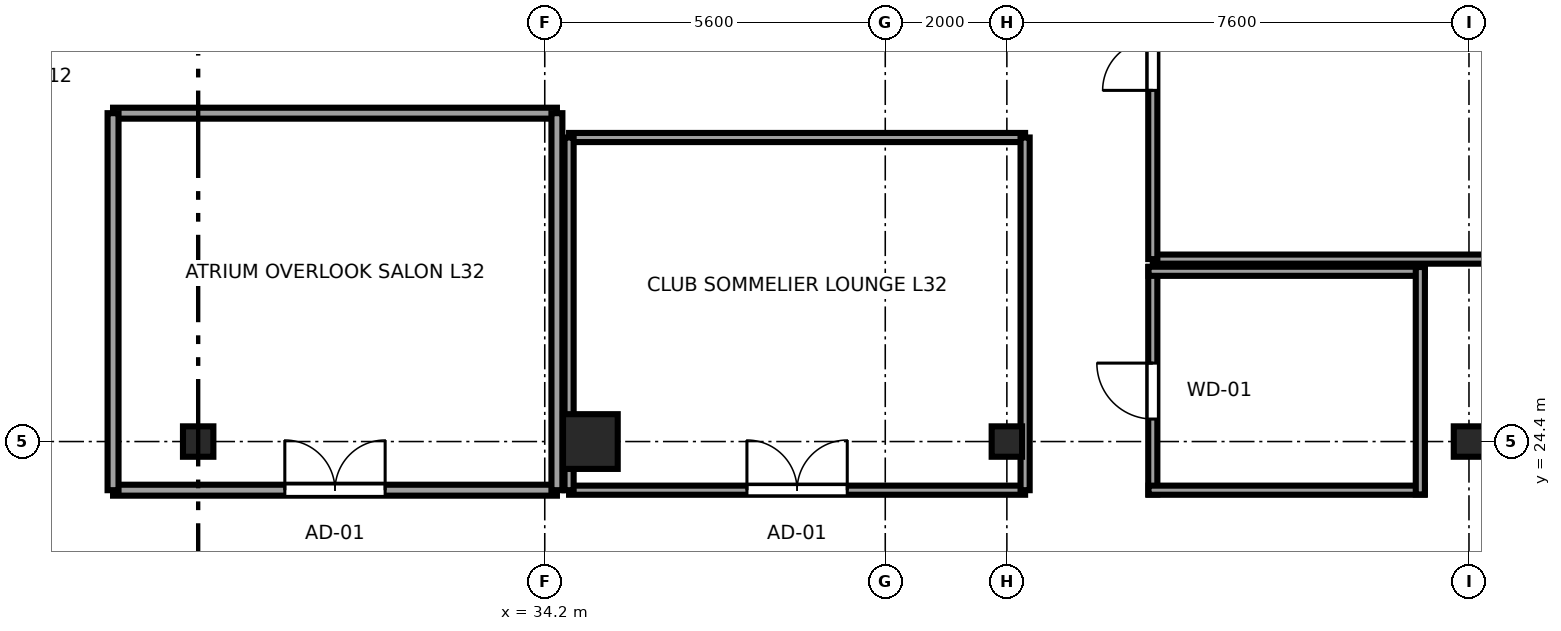
"""IFC4 building model, lengths in metres.
Left out: names, types, materials, properties, quantities, classifications, styles, units other than length and angle.
Written with IfcOpenShell. Run it as: python <this file> out.ifc"""

import sys

from ifc_helpers import new_model, si_unit, direction, frame, frame_2d, origin, origin_2d, place, context, subcontext, project, spatial, rectangle, i_section, extrude, source, transform, mapped, element, fill, save


model = new_model("IFC4")
c1 = context("Model", 3, precision=1e-05, world=origin(), true_north=direction((0.0, 1.0)))
c2 = subcontext(c1, "Body", "Model", "MODEL_VIEW")
j1 = project(units=[si_unit("LENGTHUNIT", "METRE"), si_unit("PLANEANGLEUNIT", "RADIAN")], contexts=[c1])
p1 = place(None, origin())
s1 = spatial("IfcSite", under=j1, at=p1, CompositionType="ELEMENT")
p2 = place(p1, origin())
s2 = spatial("IfcBuilding", under=s1, at=p2, CompositionType="ELEMENT")
p3 = place(p2, frame((0.0, 0.0, 125.75)))
s3 = spatial("IfcBuildingStorey", under=s2, at=p3, CompositionType="ELEMENT", Elevation=125.75)
m1 = source(origin(), c2, "Body", "SweptSolid", [
    extrude(rectangle(XDim=0.9, YDim=0.9, at=origin_2d()), origin(), (0.0, 0.0, 1.0), 3.55),
])
p4 = place(p3, frame((34.95, 24.4, 0.0), z_axis=(0.0, 0.0, 1.0), x_axis=(1.0, 0.0, 0.0)))
e1 = element("IfcColumn", 1, at=p4, inside=s3, PredefinedType="COLUMN", context=c2, shape_type="MappedRepresentation", body=[
    mapped(m1, transform((0.0, 0.0, 0.0), x_axis=(1.0, 0.0, 0.0), y_axis=(0.0, 1.0, 0.0), z_axis=(0.0, 0.0, 1.0), scale=1.0)),
])
m2 = source(origin(), c2, "Body", "SweptSolid", [
    extrude(i_section(OverallWidth=0.5, OverallDepth=0.5, WebThickness=0.022, FlangeThickness=0.034, at=origin_2d()), origin(), (0.0, 0.0, 1.0), 3.55),
])
for number, where, z_axis, x_axis in (
    (2, (41.8, 24.4, 0.0), (0.0, 0.0, 1.0), (1.0, 0.0, 0.0)),
    (3, (49.4, 24.4, 0.0), (0.0, 0.0, 1.0), (1.0, 0.0, 0.0)),
    (4, (28.5, 24.4, 0.0), (0.0, 0.0, 1.0), (1.0, 0.0, 0.0)),
):
    element("IfcColumn", number, at=place(p3, frame(where, z_axis=z_axis, x_axis=x_axis)), inside=s3, PredefinedType="COLUMN", context=c2, shape_type="MappedRepresentation", body=[
        mapped(m2, transform((0.0, 0.0, 0.0), x_axis=(1.0, 0.0, 0.0), y_axis=(0.0, 1.0, 0.0), z_axis=(0.0, 0.0, 1.0), scale=1.0)),
    ])
p5 = place(p3, frame((44.2, 23.53, 0.0), z_axis=(0.0, 0.0, 1.0), x_axis=(0.0, 1.0, 0.0)))
e5 = element("IfcWall", 5, at=p5, inside=s3, PredefinedType="PARTITIONING", context=c2, shape_type="SweptSolid", body=[
    extrude(rectangle(XDim=3.74, YDim=0.15, at=frame_2d((1.87, 0.0))), origin(), (0.0, 0.0, 1.0), 3.37),
])
p6 = place(p5, frame((1.24, 0.0, 0.0)))
e6 = element("IfcOpeningElement", 6, at=p6, cuts=e5, PredefinedType="OPENING", context=c2, shape_type="SweptSolid", body=[
    extrude(rectangle(XDim=0.92, YDim=2.01, at=frame_2d((0.46, 1.005))), frame((0.0, 0.085, 0.0), z_axis=(0.0, -1.0, 0.0), x_axis=(1.0, 0.0, 0.0)), (0.0, 0.0, 1.0), 0.17),
])
for number, where, z_axis, x_axis in (
    (7, (44.13, 23.6, 0.0), (0.0, 0.0, 1.0), (1.0, 0.0, 0.0)),
    (8, (44.13, 27.2, 0.0), (0.0, 0.0, 1.0), (1.0, 0.0, 0.0)),
):
    element("IfcWall", number, at=place(p3, frame(where, z_axis=z_axis, x_axis=x_axis)), inside=s3, PredefinedType="PARTITIONING", context=c2, shape_type="SweptSolid", body=[
        extrude(rectangle(XDim=4.54, YDim=0.15, at=frame_2d((2.27, 0.0))), origin(), (0.0, 0.0, 1.0), 3.37),
    ])
p7 = place(p3, frame((48.6, 23.53, 0.0), z_axis=(0.0, 0.0, 1.0), x_axis=(0.0, 1.0, 0.0)))
e9 = element("IfcWall", 9, at=p7, inside=s3, PredefinedType="PARTITIONING", context=c2, shape_type="SweptSolid", body=[
    extrude(rectangle(XDim=3.74, YDim=0.15, at=frame_2d((1.87, 0.0))), origin(), (0.0, 0.0, 1.0), 3.37),
])
p8 = place(p3, frame((44.2, 27.4, 0.0), z_axis=(0.0, 0.0, 1.0), x_axis=(1.0, 0.0, 0.0)))
e10 = element("IfcWall", 10, at=p8, inside=s3, PredefinedType="PARTITIONING", context=c2, shape_type="SweptSolid", body=[
    extrude(rectangle(XDim=12.5, YDim=0.15, at=frame_2d((6.25, 0.0))), origin(), (0.0, 0.0, 1.0), 3.37),
])
p9 = place(p3, frame((44.2, 27.4, 0.0), z_axis=(0.0, 0.0, 1.0), x_axis=(0.0, 1.0, 0.0)))
e11 = element("IfcWall", 11, at=p9, inside=s3, PredefinedType="PARTITIONING", context=c2, shape_type="SweptSolid", body=[
    extrude(rectangle(XDim=7.2, YDim=0.15, at=frame_2d((3.6, 0.0))), origin(), (0.0, 0.0, 1.0), 3.37),
])
p10 = place(p9, frame((2.775, 0.0, 0.0)))
e12 = element("IfcOpeningElement", 12, at=p10, cuts=e11, PredefinedType="OPENING", context=c2, shape_type="SweptSolid", body=[
    extrude(rectangle(XDim=1.65, YDim=2.15, at=frame_2d((0.825, 1.075))), frame((0.0, 0.085, 0.0), z_axis=(0.0, -1.0, 0.0), x_axis=(1.0, 0.0, 0.0)), (0.0, 0.0, 1.0), 0.17),
])
p11 = place(p3, frame((27.1, 23.6, 0.0), z_axis=(0.0, 0.0, 1.0), x_axis=(1.0, 0.0, 0.0)))
e13 = element("IfcWall", 13, at=p11, inside=s3, PredefinedType="PARTITIONING", context=c2, shape_type="SweptSolid", body=[
    extrude(rectangle(XDim=7.3, YDim=0.18, at=frame_2d((3.65, 0.0))), origin(), (0.0, 0.0, 1.0), 3.37),
])
p12 = place(p11, frame((2.825, 0.0, 0.0)))
e14 = element("IfcOpeningElement", 14, at=p12, cuts=e13, PredefinedType="OPENING", context=c2, shape_type="SweptSolid", body=[
    extrude(rectangle(XDim=1.65, YDim=2.15, at=frame_2d((0.825, 1.075))), frame((0.0, 0.1, 0.0), z_axis=(0.0, -1.0, 0.0), x_axis=(1.0, 0.0, 0.0)), (0.0, 0.0, 1.0), 0.2),
])
p13 = place(p3, frame((27.1, 29.8, 0.0), z_axis=(0.0, 0.0, 1.0), x_axis=(1.0, 0.0, 0.0)))
e15 = element("IfcWall", 15, at=p13, inside=s3, PredefinedType="PARTITIONING", context=c2, shape_type="SweptSolid", body=[
    extrude(rectangle(XDim=7.3, YDim=0.18, at=frame_2d((3.65, 0.0))), origin(), (0.0, 0.0, 1.0), 3.37),
])
for number, where, z_axis, x_axis in (
    (16, (27.1, 23.6, 0.0), (0.0, 0.0, 1.0), (0.0, 1.0, 0.0)),
    (17, (34.4, 23.6, 0.0), (0.0, 0.0, 1.0), (0.0, 1.0, 0.0)),
):
    element("IfcWall", number, at=place(p3, frame(where, z_axis=z_axis, x_axis=x_axis)), inside=s3, PredefinedType="PARTITIONING", context=c2, shape_type="SweptSolid", body=[
        extrude(rectangle(XDim=6.2, YDim=0.18, at=frame_2d((3.1, 0.0))), origin(), (0.0, 0.0, 1.0), 3.37),
    ])
p14 = place(p3, frame((34.6, 23.6, 0.0), z_axis=(0.0, 0.0, 1.0), x_axis=(1.0, 0.0, 0.0)))
e18 = element("IfcWall", 18, at=p14, inside=s3, PredefinedType="PARTITIONING", context=c2, shape_type="SweptSolid", body=[
    extrude(rectangle(XDim=7.5, YDim=0.15, at=frame_2d((3.75, 0.0))), origin(), (0.0, 0.0, 1.0), 3.37),
])
p15 = place(p14, frame((2.925, 0.0, 0.0)))
e19 = element("IfcOpeningElement", 19, at=p15, cuts=e18, PredefinedType="OPENING", context=c2, shape_type="SweptSolid", body=[
    extrude(rectangle(XDim=1.65, YDim=2.15, at=frame_2d((0.825, 1.075))), frame((0.0, 0.085, 0.0), z_axis=(0.0, -1.0, 0.0), x_axis=(1.0, 0.0, 0.0)), (0.0, 0.0, 1.0), 0.17),
])
p16 = place(p3, frame((34.6, 29.4, 0.0), z_axis=(0.0, 0.0, 1.0), x_axis=(1.0, 0.0, 0.0)))
e20 = element("IfcWall", 20, at=p16, inside=s3, PredefinedType="PARTITIONING", context=c2, shape_type="SweptSolid", body=[
    extrude(rectangle(XDim=7.5, YDim=0.15, at=frame_2d((3.75, 0.0))), origin(), (0.0, 0.0, 1.0), 3.37),
])
p17 = place(p3, frame((34.6, 23.6, 0.0), z_axis=(0.0, 0.0, 1.0), x_axis=(0.0, 1.0, 0.0)))
e21 = element("IfcWall", 21, at=p17, inside=s3, PredefinedType="PARTITIONING", context=c2, shape_type="SweptSolid", body=[
    extrude(rectangle(XDim=5.8, YDim=0.15, at=frame_2d((2.9, 0.0))), origin(), (0.0, 0.0, 1.0), 3.37),
])
p18 = place(p3, frame((42.1, 23.6, 0.0), z_axis=(0.0, 0.0, 1.0), x_axis=(0.0, 1.0, 0.0)))
e22 = element("IfcWall", 22, at=p18, inside=s3, PredefinedType="PARTITIONING", context=c2, shape_type="SweptSolid", body=[
    extrude(rectangle(XDim=5.8, YDim=0.15, at=frame_2d((2.9, 0.0))), origin(), (0.0, 0.0, 1.0), 2.16),
])
m3 = source(origin(), c2, "Body", "SweptSolid", [
    extrude(rectangle(XDim=0.92, YDim=2.01, at=frame_2d((0.46, 1.005))), frame((0.0, 0.025, 0.0), z_axis=(0.0, -1.0, 0.0), x_axis=(1.0, 0.0, 0.0)), (0.0, 0.0, 1.0), 0.05),
])
p19 = place(p6, origin())
e23 = element("IfcDoor", 23, at=p19, inside=s3, OperationType="SINGLE_SWING_RIGHT", PredefinedType="DOOR", context=c2, shape_type="MappedRepresentation", body=[
    mapped(m3, transform((0.0, 0.0, 0.0), x_axis=(1.0, 0.0, 0.0), y_axis=(0.0, 1.0, 0.0), z_axis=(0.0, 0.0, 1.0), scale=1.0)),
])
fill(e6, e23)
m4 = source(origin(), c2, "Body", "SweptSolid", [
    extrude(rectangle(XDim=1.65, YDim=2.15, at=frame_2d((0.825, 1.075))), frame((0.0, 0.025, 0.0), z_axis=(0.0, -1.0, 0.0), x_axis=(1.0, 0.0, 0.0)), (0.0, 0.0, 1.0), 0.05),
])
p20 = place(p10, origin())
e24 = element("IfcDoor", 24, at=p20, inside=s3, OperationType="DOUBLE_DOOR_SINGLE_SWING", PredefinedType="DOOR", context=c2, shape_type="MappedRepresentation", body=[
    mapped(m4, transform((0.0, 0.0, 0.0), x_axis=(1.0, 0.0, 0.0), y_axis=(0.0, 1.0, 0.0), z_axis=(0.0, 0.0, 1.0), scale=1.0)),
])
fill(e12, e24)
p21 = place(p12, origin())
e25 = element("IfcDoor", 25, at=p21, inside=s3, OperationType="DOUBLE_DOOR_SINGLE_SWING", PredefinedType="DOOR", context=c2, shape_type="MappedRepresentation", body=[
    mapped(m4, transform((0.0, 0.0, 0.0), x_axis=(1.0, 0.0, 0.0), y_axis=(0.0, 1.0, 0.0), z_axis=(0.0, 0.0, 1.0), scale=1.0)),
])
fill(e14, e25)
p22 = place(p15, origin())
e26 = element("IfcDoor", 26, at=p22, inside=s3, OperationType="DOUBLE_DOOR_SINGLE_SWING", PredefinedType="DOOR", context=c2, shape_type="MappedRepresentation", body=[
    mapped(m4, transform((0.0, 0.0, 0.0), x_axis=(1.0, 0.0, 0.0), y_axis=(0.0, 1.0, 0.0), z_axis=(0.0, 0.0, 1.0), scale=1.0)),
])
fill(e19, e26)
save(model, sys.argv[1])
